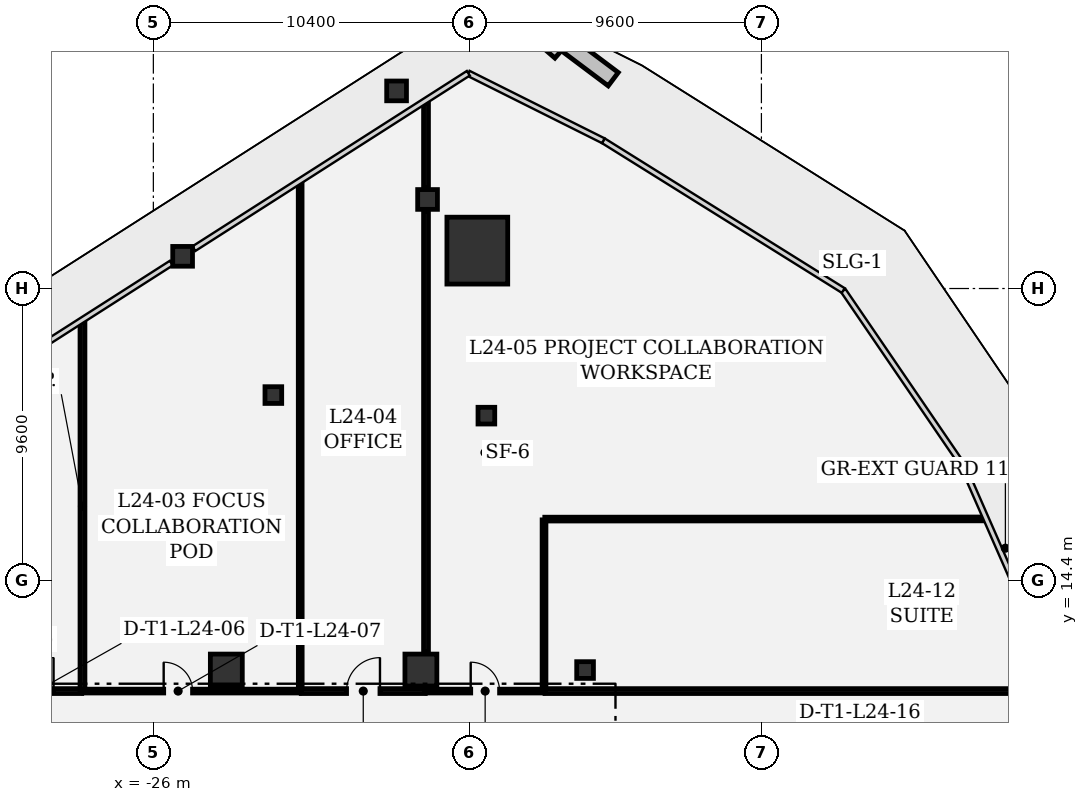
"""IFC4 building model, lengths in metres.
Left out: names, types, materials, properties, quantities, classifications, styles, units other than length and angle.
Written with IfcOpenShell. Run it as: python <this file> out.ifc"""

import sys

from ifc_helpers import new_model, si_unit, direction, frame, frame_2d, origin, origin_2d, place, context, subcontext, project, spatial, rectangle, extrude, element, fill, save


model = new_model("IFC4")
c1 = context("Model", 3, precision=1e-05, world=origin(), true_north=direction((0.0, 1.0)))
c2 = subcontext(c1, "Body", "Model", "MODEL_VIEW")
j1 = project(units=[si_unit("LENGTHUNIT", "METRE"), si_unit("PLANEANGLEUNIT", "RADIAN")], contexts=[c1])
p1 = place(None, origin())
s1 = spatial("IfcSite", under=j1, at=p1, CompositionType="ELEMENT")
p2 = place(p1, origin())
s2 = spatial("IfcBuilding", under=s1, at=p2, CompositionType="ELEMENT")
p3 = place(p2, frame((0.0, 0.0, 109.8)))
s3 = spatial("IfcBuildingStorey", under=s2, at=p3, CompositionType="ELEMENT", Elevation=109.8)
p4 = place(p3, frame((-15.344, 25.246, 0.0), z_axis=(0.0, 0.0, 1.0), x_axis=(1.0, 0.0, 0.0)))
e1 = element("IfcColumn", 1, at=p4, inside=s3, PredefinedType="COLUMN", context=c2, shape_type="SweptSolid", body=[
    extrude(rectangle(XDim=2.0, YDim=2.2, at=origin_2d()), origin(), (0.0, 0.0, 1.0), 4.05),
])
for number, where, z_axis, x_axis in (
    (2, (-23.6, 11.45, 0.0), (0.0, 0.0, 1.0), (1.0, 0.0, 0.0)),
    (3, (-17.2, 11.45, 0.0), (0.0, 0.0, 1.0), (1.0, 0.0, 0.0)),
):
    element("IfcColumn", number, at=place(p3, frame(where, z_axis=z_axis, x_axis=x_axis)), inside=s3, PredefinedType="COLUMN", context=c2, shape_type="SweptSolid", body=[
        extrude(rectangle(XDim=1.05, YDim=1.05, at=origin_2d()), origin(), (0.0, 0.0, 1.0), 4.05),
    ])
for number, where, z_axis, x_axis in (
    (4, (-18.0, 30.5, 0.0), (0.0, 0.0, 1.0), (1.0, 0.0, 0.0)),
    (5, (-25.038, 25.059, 0.0), (0.0, 0.0, 1.0), (1.0, 0.0, 0.0)),
    (6, (-16.981, 26.929, 0.0), (0.0, 0.0, 1.0), (1.0, 0.0, 0.0)),
):
    element("IfcColumn", number, at=place(p3, frame(where, z_axis=z_axis, x_axis=x_axis)), inside=s3, PredefinedType="COLUMN", context=c2, shape_type="SweptSolid", body=[
        extrude(rectangle(XDim=0.65, YDim=0.65, at=origin_2d()), origin(), (0.0, 0.0, 1.0), 4.05),
    ])
for number, where, z_axis, x_axis in (
    (7, (-22.053, 20.495, 0.0), (0.0, 0.0, 1.0), (1.0, 0.0, 0.0)),
    (8, (-15.046, 19.818, 0.0), (0.0, 0.0, 1.0), (1.0, 0.0, 0.0)),
    (9, (-11.8, 11.45, 0.0), (0.0, 0.0, 1.0), (1.0, 0.0, 0.0)),
):
    element("IfcColumn", number, at=place(p3, frame(where, z_axis=z_axis, x_axis=x_axis)), inside=s3, PredefinedType="COLUMN", context=c2, shape_type="SweptSolid", body=[
        extrude(rectangle(XDim=0.55, YDim=0.55, at=origin_2d()), origin(), (0.0, 0.0, 1.0), 4.05),
    ])
p5 = place(p3, frame((-31.309, 10.758, 0.0), z_axis=(0.0, 0.0, 1.0), x_axis=(1.0, 0.0, 0.0)))
e10 = element("IfcWall", 10, at=p5, inside=s3, PredefinedType="PARTITIONING", context=c2, shape_type="SweptSolid", body=[
    extrude(rectangle(XDim=2.952, YDim=0.16, at=frame_2d((1.476, 0.0))), origin(), (0.0, 0.0, 1.0), 3.77),
])
p6 = place(p5, frame((0.926, 0.0, 0.0)))
e11 = element("IfcOpeningElement", 11, at=p6, cuts=e10, PredefinedType="OPENING", context=c2, shape_type="SweptSolid", body=[
    extrude(rectangle(XDim=1.1, YDim=2.15, at=frame_2d((0.55, 1.075))), frame((0.0, 0.09, 0.0), z_axis=(0.0, -1.0, 0.0), x_axis=(1.0, 0.0, 0.0)), (0.0, 0.0, 1.0), 0.18),
])
p7 = place(p3, frame((-28.331, 10.783, 0.0), z_axis=(0.0, 0.0, 1.0), x_axis=(0.0, 1.0, 0.0)))
e12 = element("IfcWall", 12, at=p7, inside=s3, PredefinedType="PARTITIONING", context=c2, shape_type="SweptSolid", body=[
    extrude(rectangle(XDim=12.106, YDim=0.16, at=frame_2d((6.053, 0.0))), origin(), (0.0, 0.0, 1.0), 3.334),
])
p8 = place(p3, frame((-28.299, 10.758, 0.0), z_axis=(0.0, 0.0, 1.0), x_axis=(1.0, 0.0, 0.0)))
e13 = element("IfcWall", 13, at=p8, inside=s3, PredefinedType="PARTITIONING", context=c2, shape_type="SweptSolid", body=[
    extrude(rectangle(XDim=7.105, YDim=0.125, at=frame_2d((3.553, 0.0))), origin(), (0.0, 0.0, 1.0), 3.77),
])
p9 = place(p8, frame((2.638, 0.0, 0.0)))
e14 = element("IfcOpeningElement", 14, at=p9, cuts=e13, PredefinedType="OPENING", context=c2, shape_type="SweptSolid", body=[
    extrude(rectangle(XDim=0.95, YDim=2.15, at=frame_2d((0.475, 1.075))), frame((0.0, 0.073, 0.0), z_axis=(0.0, -1.0, 0.0), x_axis=(1.0, 0.0, 0.0)), (0.0, 0.0, 1.0), 0.145),
])
p10 = place(p3, frame((-21.168, 10.783, 0.0), z_axis=(0.0, 0.0, 1.0), x_axis=(-0.000190255964, 0.999999981901, 0.0)))
e15 = element("IfcWall", 15, at=p10, inside=s3, PredefinedType="PARTITIONING", context=c2, shape_type="SweptSolid", body=[
    extrude(rectangle(XDim=16.682, YDim=0.125, at=frame_2d((8.341, 0.0))), origin(), (0.0, 0.0, 1.0), 2.885),
])
p11 = place(p3, frame((-21.135, 10.758, 0.0), z_axis=(0.0, 0.0, 1.0), x_axis=(1.0, 0.0, 0.0)))
e16 = element("IfcWall", 16, at=p11, inside=s3, PredefinedType="PARTITIONING", context=c2, shape_type="SweptSolid", body=[
    extrude(rectangle(XDim=4.079, YDim=0.16, at=frame_2d((2.039, 0.0))), origin(), (0.0, 0.0, 1.0), 3.77),
])
p12 = place(p11, frame((1.489, 0.0, 0.0)))
e17 = element("IfcOpeningElement", 17, at=p12, cuts=e16, PredefinedType="OPENING", context=c2, shape_type="SweptSolid", body=[
    extrude(rectangle(XDim=1.1, YDim=2.15, at=frame_2d((0.55, 1.075))), frame((0.0, 0.09, 0.0), z_axis=(0.0, -1.0, 0.0), x_axis=(1.0, 0.0, 0.0)), (0.0, 0.0, 1.0), 0.18),
])
p13 = place(p3, frame((-17.032, 12.04, 0.0), z_axis=(0.0, 0.0, 1.0), x_axis=(0.0, 1.0, 0.0)))
e18 = element("IfcWall", 18, at=p13, inside=s3, PredefinedType="PARTITIONING", context=c2, shape_type="SweptSolid", body=[
    extrude(rectangle(XDim=14.499, YDim=0.16, at=frame_2d((7.25, 0.0))), origin(), (0.0, 0.0, 1.0), 2.885),
])
p14 = place(p3, frame((-17.032, 27.319, 0.0), z_axis=(0.0, 0.0, 1.0), x_axis=(0.0, 1.0, 0.0)))
e19 = element("IfcWall", 19, at=p14, inside=s3, PredefinedType="PARTITIONING", context=c2, shape_type="SweptSolid", body=[
    extrude(rectangle(XDim=2.792, YDim=0.16, at=frame_2d((1.396, 0.0))), origin(), (0.0, 0.0, 1.0), 3.77),
])
p15 = place(p3, frame((-16.999, 10.758, 0.0), z_axis=(0.0, 0.0, 1.0), x_axis=(1.0, 0.0, 0.0)))
e20 = element("IfcWall", 20, at=p15, inside=s3, PredefinedType="PARTITIONING", context=c2, shape_type="SweptSolid", body=[
    extrude(rectangle(XDim=3.824, YDim=0.125, at=frame_2d((1.912, 0.0))), origin(), (0.0, 0.0, 1.0), 2.885),
])
p16 = place(p15, frame((1.437, 0.0, 0.0)))
e21 = element("IfcOpeningElement", 21, at=p16, cuts=e20, PredefinedType="OPENING", context=c2, shape_type="SweptSolid", body=[
    extrude(rectangle(XDim=0.95, YDim=2.15, at=frame_2d((0.475, 1.075))), frame((0.0, 0.073, 0.0), z_axis=(0.0, -1.0, 0.0), x_axis=(1.0, 0.0, 0.0)), (0.0, 0.0, 1.0), 0.145),
])
p17 = place(p3, frame((-13.15, 16.39, 0.0), z_axis=(0.0, 0.0, 1.0), x_axis=(0.0, -1.0, 0.0)))
e22 = element("IfcWall", 22, at=p17, inside=s3, PredefinedType="PARTITIONING", context=c2, shape_type="SweptSolid", body=[
    extrude(rectangle(XDim=5.607, YDim=0.125, at=frame_2d((2.803, 0.0))), origin(), (0.0, 0.0, 1.0), 2.89),
])
p18 = place(p3, frame((-13.125, 16.415, 0.0), z_axis=(0.0, 0.0, 1.0), x_axis=(0.999999910658, 0.000422711402, 0.0)))
e23 = element("IfcWall", 23, at=p18, inside=s3, PredefinedType="PARTITIONING", context=c2, shape_type="SweptSolid", body=[
    extrude(rectangle(XDim=14.439, YDim=0.125, at=frame_2d((7.219, 0.0))), origin(), (0.0, 0.0, 1.0), 3.334),
])
p19 = place(p3, frame((3.581, 10.758, 0.0), z_axis=(0.0, 0.0, 1.0), x_axis=(-1.0, 0.0, 0.0)))
e24 = element("IfcWall", 24, at=p19, inside=s3, PredefinedType="PARTITIONING", context=c2, shape_type="SweptSolid", body=[
    extrude(rectangle(XDim=16.698, YDim=0.16, at=frame_2d((8.349, 0.0))), origin(), (0.0, 0.0, 1.0), 3.77),
])
p20 = place(p6, origin())
e25 = element("IfcDoor", 25, at=p20, inside=s3, OperationType="SINGLE_SWING_RIGHT", PredefinedType="DOOR", context=c2, shape_type="SweptSolid", body=[
    extrude(rectangle(XDim=1.1, YDim=2.15, at=frame_2d((0.55, 1.075))), frame((0.0, 0.025, 0.0), z_axis=(0.0, -1.0, 0.0), x_axis=(1.0, 0.0, 0.0)), (0.0, 0.0, 1.0), 0.05),
])
fill(e11, e25)
p21 = place(p9, origin())
e26 = element("IfcDoor", 26, at=p21, inside=s3, OperationType="SINGLE_SWING_LEFT", PredefinedType="DOOR", context=c2, shape_type="SweptSolid", body=[
    extrude(rectangle(XDim=0.95, YDim=2.15, at=frame_2d((0.475, 1.075))), frame((0.0, 0.025, 0.0), z_axis=(0.0, -1.0, 0.0), x_axis=(1.0, 0.0, 0.0)), (0.0, 0.0, 1.0), 0.05),
])
fill(e14, e26)
p22 = place(p12, origin())
e27 = element("IfcDoor", 27, at=p22, inside=s3, OperationType="SINGLE_SWING_RIGHT", PredefinedType="DOOR", context=c2, shape_type="SweptSolid", body=[
    extrude(rectangle(XDim=1.1, YDim=2.15, at=frame_2d((0.55, 1.075))), frame((0.0, 0.025, 0.0), z_axis=(0.0, -1.0, 0.0), x_axis=(1.0, 0.0, 0.0)), (0.0, 0.0, 1.0), 0.05),
])
fill(e17, e27)
p23 = place(p16, origin())
e28 = element("IfcDoor", 28, at=p23, inside=s3, OperationType="SINGLE_SWING_LEFT", PredefinedType="DOOR", context=c2, shape_type="SweptSolid", body=[
    extrude(rectangle(XDim=0.95, YDim=2.15, at=frame_2d((0.475, 1.075))), frame((0.0, 0.025, 0.0), z_axis=(0.0, -1.0, 0.0), x_axis=(1.0, 0.0, 0.0)), (0.0, 0.0, 1.0), 0.05),
])
fill(e21, e28)
save(model, sys.argv[1])
